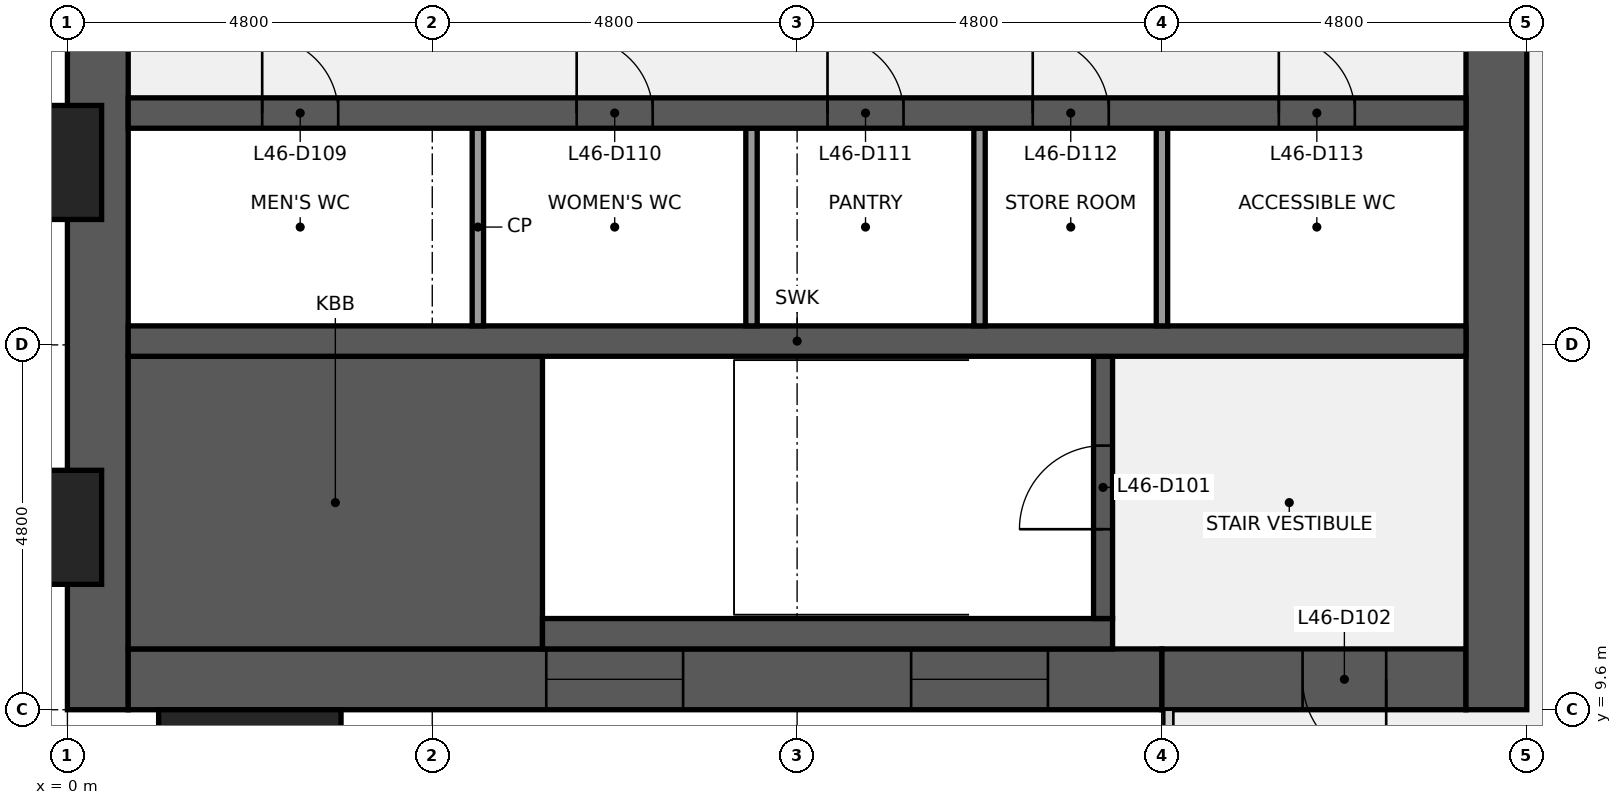
"""IFC4 building model, lengths in metres.
Left out: names, types, materials, properties, quantities, classifications, styles, units other than length and angle.
Written with IfcOpenShell. Run it as: python <this file> out.ifc"""

import sys

from ifc_helpers import new_model, si_unit, direction, frame, frame_2d, origin, origin_2d, place, context, subcontext, project, spatial, rectangle, extrude, element, fill, save


model = new_model("IFC4")
c1 = context("Model", 3, precision=1e-05, world=origin(), true_north=direction((0.0, 1.0)))
c2 = subcontext(c1, "Body", "Model", "MODEL_VIEW")
j1 = project(units=[si_unit("LENGTHUNIT", "METRE"), si_unit("PLANEANGLEUNIT", "RADIAN")], contexts=[c1])
p1 = place(None, origin())
s1 = spatial("IfcSite", under=j1, at=p1, CompositionType="ELEMENT")
p2 = place(p1, origin())
s2 = spatial("IfcBuilding", under=s1, at=p2, CompositionType="ELEMENT")
p3 = place(p2, frame((0.0, 0.0, 213.2)))
s3 = spatial("IfcBuildingStorey", under=s2, at=p3, CompositionType="ELEMENT", Elevation=213.2)
p4 = place(p3, frame((0.4, 9.6, 0.0), z_axis=(0.0, 0.0, 1.0), x_axis=(0.0, 1.0, 0.0)))
e1 = element("IfcWall", 1, at=p4, inside=s3, PredefinedType="SHEAR", context=c2, shape_type="SweptSolid", body=[
    extrude(rectangle(XDim=28.8, YDim=0.8, at=frame_2d((14.4, 0.0))), origin(), (0.0, 0.0, 1.0), 3.84),
])
p5 = place(p4, frame((8.85, 0.0, 0.9)))
e2 = element("IfcOpeningElement", 2, at=p5, cuts=e1, PredefinedType="OPENING", context=c2, shape_type="SweptSolid", body=[
    extrude(rectangle(XDim=1.5, YDim=1.5, at=frame_2d((0.75, 0.75))), frame((0.0, 0.41, 0.0), z_axis=(0.0, -1.0, 0.0), x_axis=(1.0, 0.0, 0.0)), (0.0, 0.0, 1.0), 0.82),
])
p6 = place(p4, frame((18.45, 0.0, 0.9)))
e3 = element("IfcOpeningElement", 3, at=p6, cuts=e1, PredefinedType="OPENING", context=c2, shape_type="SweptSolid", body=[
    extrude(rectangle(XDim=1.5, YDim=1.5, at=frame_2d((0.75, 0.75))), frame((0.0, 0.41, 0.0), z_axis=(0.0, -1.0, 0.0), x_axis=(1.0, 0.0, 0.0)), (0.0, 0.0, 1.0), 0.82),
])
p7 = place(p3, frame((14.4, 10.0, 0.0), z_axis=(0.0, 0.0, 1.0), x_axis=(-1.0, 0.0, 0.0)))
e4 = element("IfcWall", 4, at=p7, inside=s3, PredefinedType="SHEAR", context=c2, shape_type="SweptSolid", body=[
    extrude(rectangle(XDim=13.6, YDim=0.8, at=frame_2d((6.8, 0.0))), origin(), (0.0, 0.0, 1.0), 3.84),
])
p8 = place(p7, frame((6.3, 0.0, 0.9)))
e5 = element("IfcOpeningElement", 5, at=p8, cuts=e4, PredefinedType="OPENING", context=c2, shape_type="SweptSolid", body=[
    extrude(rectangle(XDim=1.8, YDim=1.5, at=frame_2d((0.9, 0.75))), frame((0.0, 0.41, 0.0), z_axis=(0.0, -1.0, 0.0), x_axis=(1.0, 0.0, 0.0)), (0.0, 0.0, 1.0), 0.82),
])
p9 = place(p7, frame((1.5, 0.0, 0.9)))
e6 = element("IfcOpeningElement", 6, at=p9, cuts=e4, PredefinedType="OPENING", context=c2, shape_type="SweptSolid", body=[
    extrude(rectangle(XDim=1.8, YDim=1.5, at=frame_2d((0.9, 0.75))), frame((0.0, 0.41, 0.0), z_axis=(0.0, -1.0, 0.0), x_axis=(1.0, 0.0, 0.0)), (0.0, 0.0, 1.0), 0.82),
])
p10 = place(p3, frame((18.4, 10.0, 0.0), z_axis=(0.0, 0.0, 1.0), x_axis=(-1.0, 0.0, 0.0)))
e7 = element("IfcWall", 7, at=p10, inside=s3, PredefinedType="SHEAR", context=c2, shape_type="SweptSolid", body=[
    extrude(rectangle(XDim=4.0, YDim=0.8, at=frame_2d((2.0, 0.0))), origin(), (0.0, 0.0, 1.0), 3.84),
])
p11 = place(p10, frame((1.05, 0.0, 0.0)))
e8 = element("IfcOpeningElement", 8, at=p11, cuts=e7, PredefinedType="OPENING", context=c2, shape_type="SweptSolid", body=[
    extrude(rectangle(XDim=1.1, YDim=2.1, at=frame_2d((0.55, 1.05))), frame((0.0, 0.41, 0.0), z_axis=(0.0, -1.0, 0.0), x_axis=(1.0, 0.0, 0.0)), (0.0, 0.0, 1.0), 0.82),
])
p12 = place(p3, frame((18.8, 38.4, 0.0), z_axis=(0.0, 0.0, 1.0), x_axis=(0.0, -1.0, 0.0)))
e9 = element("IfcWall", 9, at=p12, inside=s3, PredefinedType="SHEAR", context=c2, shape_type="SweptSolid", body=[
    extrude(rectangle(XDim=28.8, YDim=0.8, at=frame_2d((14.4, 0.0))), origin(), (0.0, 0.0, 1.0), 3.84),
])
p13 = place(p12, frame((18.3, 0.0, 0.0)))
e10 = element("IfcOpeningElement", 10, at=p13, cuts=e9, PredefinedType="OPENING", context=c2, shape_type="SweptSolid", body=[
    extrude(rectangle(XDim=1.8, YDim=2.1, at=frame_2d((0.9, 1.05))), frame((0.0, 0.41, 0.0), z_axis=(0.0, -1.0, 0.0), x_axis=(1.0, 0.0, 0.0)), (0.0, 0.0, 1.0), 0.82),
])
p14 = place(p12, frame((8.7, 0.0, 0.0)))
e11 = element("IfcOpeningElement", 11, at=p14, cuts=e9, PredefinedType="OPENING", context=c2, shape_type="SweptSolid", body=[
    extrude(rectangle(XDim=1.8, YDim=2.1, at=frame_2d((0.9, 1.05))), frame((0.0, 0.41, 0.0), z_axis=(0.0, -1.0, 0.0), x_axis=(1.0, 0.0, 0.0)), (0.0, 0.0, 1.0), 0.82),
])
p15 = place(p3, frame((0.8, 12.325, 0.0), z_axis=(0.0, 0.0, 1.0), x_axis=(1.0, 0.0, 0.0)))
e12 = element("IfcWall", 12, at=p15, inside=s3, PredefinedType="SHEAR", context=c2, shape_type="SweptSolid", body=[
    extrude(rectangle(XDim=5.45, YDim=3.85, at=frame_2d((2.725, 0.0))), origin(), (0.0, 0.0, 1.0), 3.84),
])
p16 = place(p3, frame((6.25, 10.6, 0.0), z_axis=(0.0, 0.0, 1.0), x_axis=(1.0, 0.0, 0.0)))
e13 = element("IfcWall", 13, at=p16, inside=s3, PredefinedType="SHEAR", context=c2, shape_type="SweptSolid", body=[
    extrude(rectangle(XDim=7.5, YDim=0.4, at=frame_2d((3.75, 0.0))), origin(), (0.0, 0.0, 1.0), 3.84),
])
p17 = place(p3, frame((13.625, 10.8, 0.0), z_axis=(0.0, 0.0, 1.0), x_axis=(0.0, 1.0, 0.0)))
e14 = element("IfcWall", 14, at=p17, inside=s3, PredefinedType="SHEAR", context=c2, shape_type="SweptSolid", body=[
    extrude(rectangle(XDim=3.45, YDim=0.25, at=frame_2d((1.725, 0.0))), origin(), (0.0, 0.0, 1.0), 3.84),
])
p18 = place(p17, frame((1.175, 0.0, 0.0)))
e15 = element("IfcOpeningElement", 15, at=p18, cuts=e14, PredefinedType="OPENING", context=c2, shape_type="SweptSolid", body=[
    extrude(rectangle(XDim=1.1, YDim=2.1, at=frame_2d((0.55, 1.05))), frame((0.0, 0.135, 0.0), z_axis=(0.0, -1.0, 0.0), x_axis=(1.0, 0.0, 0.0)), (0.0, 0.0, 1.0), 0.27),
])
p19 = place(p3, frame((0.8, 14.45, 0.0), z_axis=(0.0, 0.0, 1.0), x_axis=(1.0, 0.0, 0.0)))
e16 = element("IfcWall", 16, at=p19, inside=s3, PredefinedType="SHEAR", context=c2, shape_type="SweptSolid", body=[
    extrude(rectangle(XDim=17.6, YDim=0.4, at=frame_2d((8.8, 0.0))), origin(), (0.0, 0.0, 1.0), 3.84),
])
for number, where, z_axis, x_axis in (
    (17, (5.4, 14.65, 0.0), (0.0, 0.0, 1.0), (0.0, 1.0, 0.0)),
    (18, (9.0, 14.65, 0.0), (0.0, 0.0, 1.0), (0.0, 1.0, 0.0)),
    (19, (12.0, 14.65, 0.0), (0.0, 0.0, 1.0), (0.0, 1.0, 0.0)),
    (20, (14.4, 14.65, 0.0), (0.0, 0.0, 1.0), (0.0, 1.0, 0.0)),
):
    element("IfcWall", number, at=place(p3, frame(where, z_axis=z_axis, x_axis=x_axis)), inside=s3, PredefinedType="PARTITIONING", context=c2, shape_type="SweptSolid", body=[
        extrude(rectangle(XDim=2.6, YDim=0.15, at=frame_2d((1.3, 0.0))), origin(), (0.0, 0.0, 1.0), 3.84),
    ])
p20 = place(p3, frame((0.8, 17.45, 0.0), z_axis=(0.0, 0.0, 1.0), x_axis=(1.0, 0.0, 0.0)))
e21 = element("IfcWall", 21, at=p20, inside=s3, PredefinedType="SHEAR", context=c2, shape_type="SweptSolid", body=[
    extrude(rectangle(XDim=17.6, YDim=0.4, at=frame_2d((8.8, 0.0))), origin(), (0.0, 0.0, 1.0), 3.84),
])
p21 = place(p20, frame((1.762, 0.0, 0.0)))
e22 = element("IfcOpeningElement", 22, at=p21, cuts=e21, PredefinedType="OPENING", context=c2, shape_type="SweptSolid", body=[
    extrude(rectangle(XDim=1.0, YDim=2.1, at=frame_2d((0.5, 1.05))), frame((0.0, 0.21, 0.0), z_axis=(0.0, -1.0, 0.0), x_axis=(1.0, 0.0, 0.0)), (0.0, 0.0, 1.0), 0.42),
])
p22 = place(p20, frame((5.9, 0.0, 0.0)))
e23 = element("IfcOpeningElement", 23, at=p22, cuts=e21, PredefinedType="OPENING", context=c2, shape_type="SweptSolid", body=[
    extrude(rectangle(XDim=1.0, YDim=2.1, at=frame_2d((0.5, 1.05))), frame((0.0, 0.21, 0.0), z_axis=(0.0, -1.0, 0.0), x_axis=(1.0, 0.0, 0.0)), (0.0, 0.0, 1.0), 0.42),
])
p23 = place(p20, frame((9.2, 0.0, 0.0)))
e24 = element("IfcOpeningElement", 24, at=p23, cuts=e21, PredefinedType="OPENING", context=c2, shape_type="SweptSolid", body=[
    extrude(rectangle(XDim=1.0, YDim=2.1, at=frame_2d((0.5, 1.05))), frame((0.0, 0.21, 0.0), z_axis=(0.0, -1.0, 0.0), x_axis=(1.0, 0.0, 0.0)), (0.0, 0.0, 1.0), 0.42),
])
p24 = place(p20, frame((11.9, 0.0, 0.0)))
e25 = element("IfcOpeningElement", 25, at=p24, cuts=e21, PredefinedType="OPENING", context=c2, shape_type="SweptSolid", body=[
    extrude(rectangle(XDim=1.0, YDim=2.1, at=frame_2d((0.5, 1.05))), frame((0.0, 0.21, 0.0), z_axis=(0.0, -1.0, 0.0), x_axis=(1.0, 0.0, 0.0)), (0.0, 0.0, 1.0), 0.42),
])
p25 = place(p20, frame((15.137, 0.0, 0.0)))
e26 = element("IfcOpeningElement", 26, at=p25, cuts=e21, PredefinedType="OPENING", context=c2, shape_type="SweptSolid", body=[
    extrude(rectangle(XDim=1.0, YDim=2.1, at=frame_2d((0.5, 1.05))), frame((0.0, 0.21, 0.0), z_axis=(0.0, -1.0, 0.0), x_axis=(1.0, 0.0, 0.0)), (0.0, 0.0, 1.0), 0.42),
])
for number, where, z_axis, x_axis in (
    (27, (-0.75, 12.0, 0.0), (0.0, 0.0, 1.0), (0.0, 1.0, 0.0)),
    (28, (-0.75, 16.8, 0.0), (0.0, 0.0, 1.0), (0.0, 1.0, 0.0)),
    (29, (2.4, 8.85, 0.0), (0.0, 0.0, 1.0), (1.0, 0.0, 0.0)),
):
    element("IfcColumn", number, at=place(p3, frame(where, z_axis=z_axis, x_axis=x_axis)), inside=s3, PredefinedType="PILASTER", context=c2, shape_type="SweptSolid", body=[
        extrude(rectangle(XDim=2.4, YDim=1.5, at=origin_2d()), origin(), (0.0, 0.0, 1.0), 4.0),
    ])
p26 = place(p18, origin())
e30 = element("IfcDoor", 30, at=p26, inside=s3, OperationType="SINGLE_SWING_LEFT", PredefinedType="DOOR", context=c2, shape_type="SweptSolid", body=[
    extrude(rectangle(XDim=1.1, YDim=2.1, at=frame_2d((0.55, 1.05))), frame((0.0, 0.025, 0.0), z_axis=(0.0, -1.0, 0.0), x_axis=(1.0, 0.0, 0.0)), (0.0, 0.0, 1.0), 0.05),
])
fill(e15, e30)
p27 = place(p11, origin())
e31 = element("IfcDoor", 31, at=p27, inside=s3, OperationType="SINGLE_SWING_LEFT", PredefinedType="DOOR", context=c2, shape_type="SweptSolid", body=[
    extrude(rectangle(XDim=1.1, YDim=2.1, at=frame_2d((0.55, 1.05))), frame((0.0, 0.025, 0.0), z_axis=(0.0, -1.0, 0.0), x_axis=(1.0, 0.0, 0.0)), (0.0, 0.0, 1.0), 0.05),
])
fill(e8, e31)
p28 = place(p21, origin())
e32 = element("IfcDoor", 32, at=p28, inside=s3, OperationType="SINGLE_SWING_LEFT", PredefinedType="DOOR", context=c2, shape_type="SweptSolid", body=[
    extrude(rectangle(XDim=1.0, YDim=2.1, at=frame_2d((0.5, 1.05))), frame((0.0, 0.025, 0.0), z_axis=(0.0, -1.0, 0.0), x_axis=(1.0, 0.0, 0.0)), (0.0, 0.0, 1.0), 0.05),
])
fill(e22, e32)
p29 = place(p22, origin())
e33 = element("IfcDoor", 33, at=p29, inside=s3, OperationType="SINGLE_SWING_LEFT", PredefinedType="DOOR", context=c2, shape_type="SweptSolid", body=[
    extrude(rectangle(XDim=1.0, YDim=2.1, at=frame_2d((0.5, 1.05))), frame((0.0, 0.025, 0.0), z_axis=(0.0, -1.0, 0.0), x_axis=(1.0, 0.0, 0.0)), (0.0, 0.0, 1.0), 0.05),
])
fill(e23, e33)
p30 = place(p23, origin())
e34 = element("IfcDoor", 34, at=p30, inside=s3, OperationType="SINGLE_SWING_LEFT", PredefinedType="DOOR", context=c2, shape_type="SweptSolid", body=[
    extrude(rectangle(XDim=1.0, YDim=2.1, at=frame_2d((0.5, 1.05))), frame((0.0, 0.025, 0.0), z_axis=(0.0, -1.0, 0.0), x_axis=(1.0, 0.0, 0.0)), (0.0, 0.0, 1.0), 0.05),
])
fill(e24, e34)
p31 = place(p24, origin())
e35 = element("IfcDoor", 35, at=p31, inside=s3, OperationType="SINGLE_SWING_LEFT", PredefinedType="DOOR", context=c2, shape_type="SweptSolid", body=[
    extrude(rectangle(XDim=1.0, YDim=2.1, at=frame_2d((0.5, 1.05))), frame((0.0, 0.025, 0.0), z_axis=(0.0, -1.0, 0.0), x_axis=(1.0, 0.0, 0.0)), (0.0, 0.0, 1.0), 0.05),
])
fill(e25, e35)
p32 = place(p25, origin())
e36 = element("IfcDoor", 36, at=p32, inside=s3, OperationType="SINGLE_SWING_LEFT", PredefinedType="DOOR", context=c2, shape_type="SweptSolid", body=[
    extrude(rectangle(XDim=1.0, YDim=2.1, at=frame_2d((0.5, 1.05))), frame((0.0, 0.025, 0.0), z_axis=(0.0, -1.0, 0.0), x_axis=(1.0, 0.0, 0.0)), (0.0, 0.0, 1.0), 0.05),
])
fill(e26, e36)
p33 = place(p8, origin())
e37 = element("IfcWindow", 37, at=p33, inside=s3, PartitioningType="SINGLE_PANEL", PredefinedType="WINDOW", context=c2, shape_type="SweptSolid", body=[
    extrude(rectangle(XDim=1.8, YDim=1.5, at=frame_2d((0.9, 0.75))), frame((0.0, 0.03, 0.0), z_axis=(0.0, -1.0, 0.0), x_axis=(1.0, 0.0, 0.0)), (0.0, 0.0, 1.0), 0.06),
])
fill(e5, e37)
p34 = place(p9, origin())
e38 = element("IfcWindow", 38, at=p34, inside=s3, PartitioningType="SINGLE_PANEL", PredefinedType="WINDOW", context=c2, shape_type="SweptSolid", body=[
    extrude(rectangle(XDim=1.8, YDim=1.5, at=frame_2d((0.9, 0.75))), frame((0.0, 0.03, 0.0), z_axis=(0.0, -1.0, 0.0), x_axis=(1.0, 0.0, 0.0)), (0.0, 0.0, 1.0), 0.06),
])
fill(e6, e38)
save(model, sys.argv[1])
